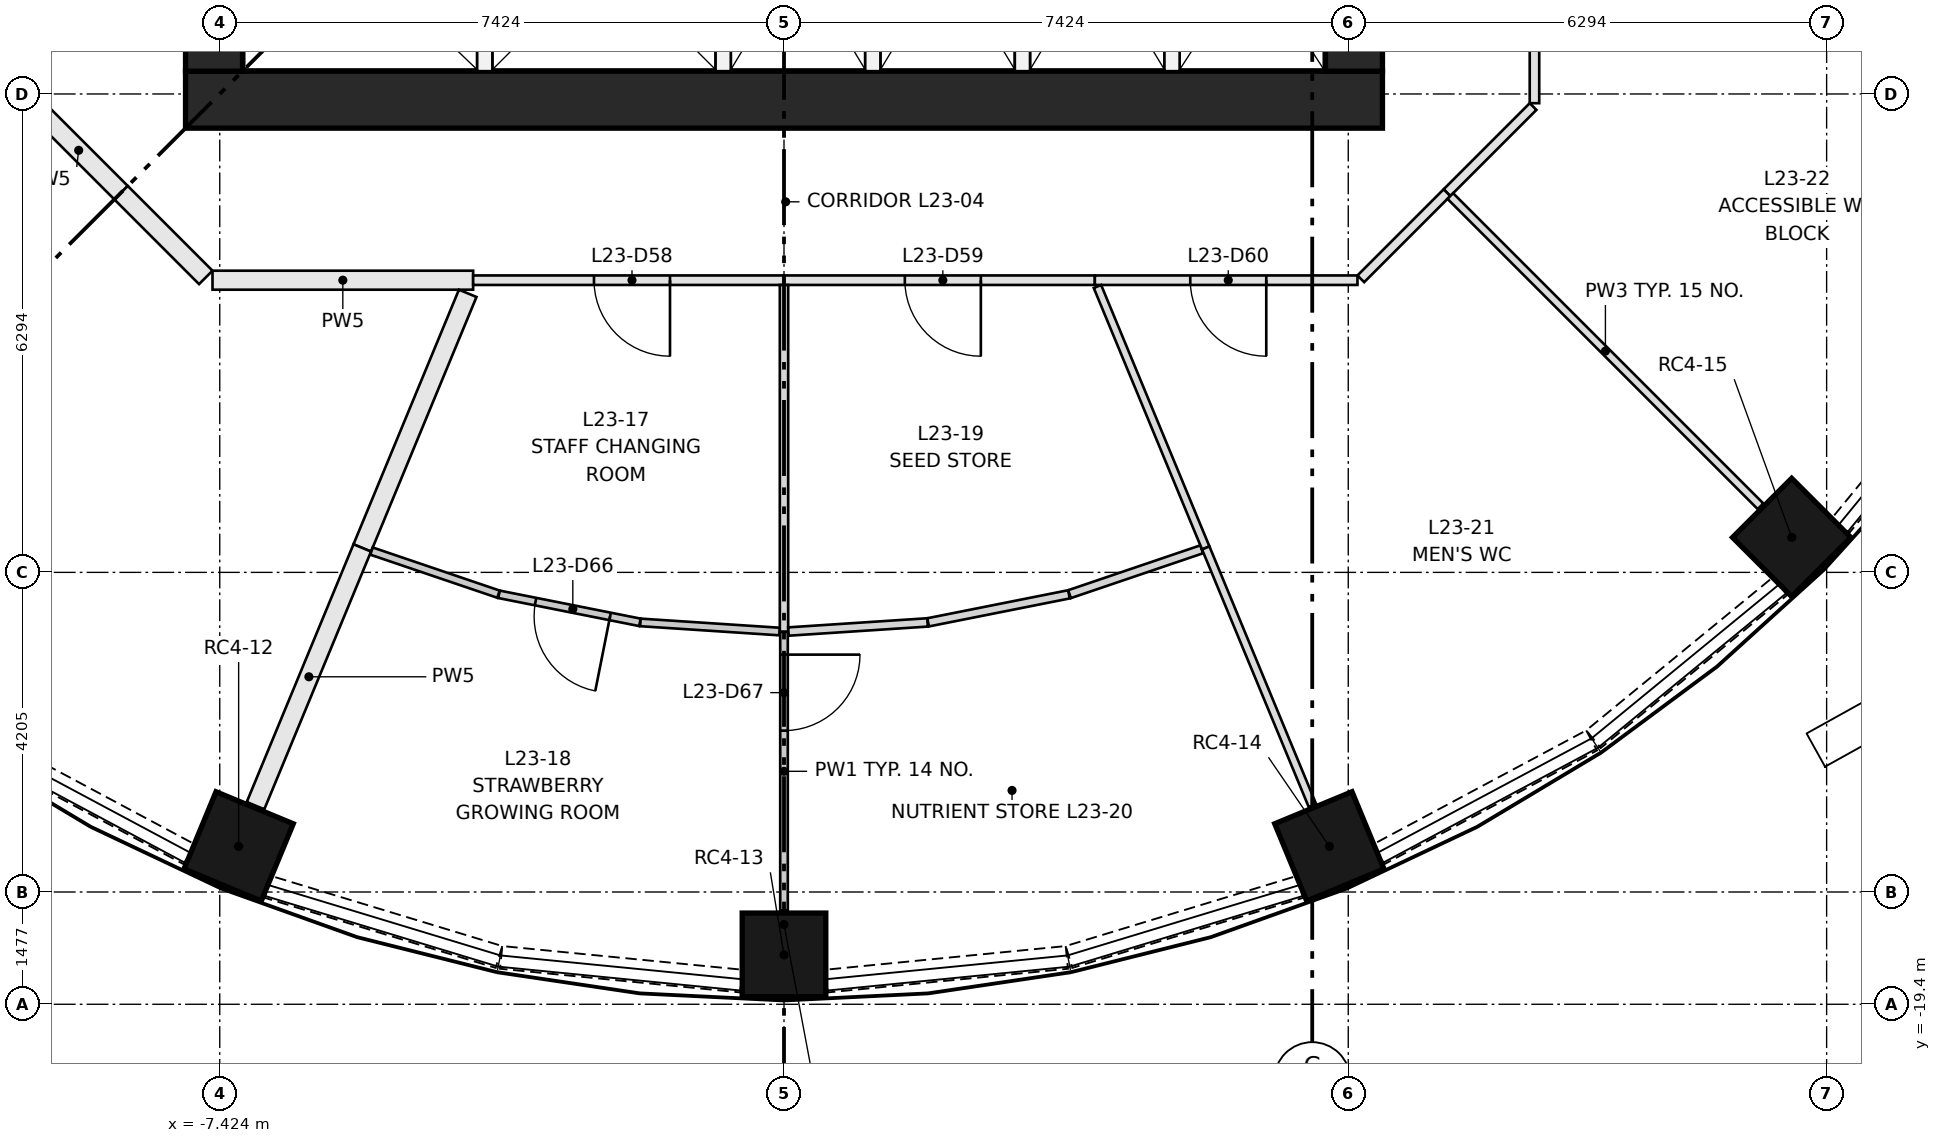
"""IFC4 building model, lengths in metres.
Left out: names, types, materials, properties, quantities, classifications, styles, units other than length and angle.
Written with IfcOpenShell. Run it as: python <this file> out.ifc"""

import sys

from ifc_helpers import new_model, si_unit, direction, frame, frame_2d, origin, origin_2d, place, context, subcontext, project, spatial, rectangle, extrude, element, fill, save


model = new_model("IFC4")
c1 = context("Model", 3, precision=1e-05, world=origin(), true_north=direction((0.0, 1.0)))
c2 = subcontext(c1, "Body", "Model", "MODEL_VIEW")
j1 = project(units=[si_unit("LENGTHUNIT", "METRE"), si_unit("PLANEANGLEUNIT", "RADIAN")], contexts=[c1])
p1 = place(None, origin())
s1 = spatial("IfcSite", under=j1, at=p1, CompositionType="ELEMENT")
p2 = place(p1, origin())
s2 = spatial("IfcBuilding", under=s1, at=p2, CompositionType="ELEMENT")
p3 = place(p2, frame((0.0, 0.0, 91.0)))
s3 = spatial("IfcBuildingStorey", under=s2, at=p3, CompositionType="ELEMENT", Elevation=91.0)
for number, where, z_axis, x_axis in (
    (1, (-7.175, -17.323, 0.0), (0.0, 0.0, 1.0), (-0.383, -0.924, 0.0)),
    (2, (0.0, -18.75, 0.0), (0.0, 0.0, 1.0), (0.0, -1.0, 0.0)),
    (3, (7.175, -17.323, 0.0), (0.0, 0.0, 1.0), (0.383, -0.924, 0.0)),
    (4, (13.258, -13.258, 0.0), (0.0, 0.0, 1.0), (0.707, -0.707, 0.0)),
):
    element("IfcColumn", number, at=place(p3, frame(where, z_axis=z_axis, x_axis=x_axis)), inside=s3, PredefinedType="COLUMN", context=c2, shape_type="SweptSolid", body=[
        extrude(rectangle(XDim=1.1, YDim=1.1, at=origin_2d()), origin(), (0.0, 0.0, 1.0), 3.65),
    ])
p4 = place(p3, frame((-7.874, -7.499, 0.0), z_axis=(0.0, 0.0, 1.0), x_axis=(1.0, 0.0, 0.0)))
e5 = element("IfcWall", 5, at=p4, inside=s3, PredefinedType="SHEAR", context=c2, shape_type="SweptSolid", body=[
    extrude(rectangle(XDim=15.748, YDim=0.75, at=frame_2d((7.874, 0.0))), origin(), (0.0, 0.0, 1.0), 3.65),
])
p5 = place(p3, frame((-7.499, -7.124, 0.0), z_axis=(0.0, 0.0, 1.0), x_axis=(0.0, 1.0, 0.0)))
e6 = element("IfcWall", 6, at=p5, inside=s3, PredefinedType="SHEAR", context=c2, shape_type="SweptSolid", body=[
    extrude(rectangle(XDim=14.248, YDim=0.75, at=frame_2d((7.124, 0.0))), origin(), (0.0, 0.0, 1.0), 3.65),
])
p6 = place(p5, frame((6.624, 0.0, 0.0)))
e7 = element("IfcOpeningElement", 7, at=p6, cuts=e6, PredefinedType="OPENING", context=c2, shape_type="SweptSolid", body=[
    extrude(rectangle(XDim=1.0, YDim=2.1, at=frame_2d((0.5, 1.05))), frame((0.0, 0.385, 0.0), z_axis=(0.0, -1.0, 0.0), x_axis=(1.0, 0.0, 0.0)), (0.0, 0.0, 1.0), 0.77),
])
p7 = place(p5, frame((3.5, 0.0, 0.0)))
e8 = element("IfcOpeningElement", 8, at=p7, cuts=e6, PredefinedType="OPENING", context=c2, shape_type="SweptSolid", body=[
    extrude(rectangle(XDim=1.8, YDim=2.1, at=frame_2d((0.9, 1.05))), frame((0.0, 0.385, 0.0), z_axis=(0.0, -1.0, 0.0), x_axis=(1.0, 0.0, 0.0)), (0.0, 0.0, 1.0), 0.77),
])
p8 = place(p5, frame((8.948, 0.0, 0.0)))
e9 = element("IfcOpeningElement", 9, at=p8, cuts=e6, PredefinedType="OPENING", context=c2, shape_type="SweptSolid", body=[
    extrude(rectangle(XDim=1.8, YDim=2.1, at=frame_2d((0.9, 1.05))), frame((0.0, 0.385, 0.0), z_axis=(0.0, -1.0, 0.0), x_axis=(1.0, 0.0, 0.0)), (0.0, 0.0, 1.0), 0.77),
])
p9 = place(p5, frame((12.124, 0.0, 0.0)))
e10 = element("IfcOpeningElement", 10, at=p9, cuts=e6, PredefinedType="OPENING", context=c2, shape_type="SweptSolid", body=[
    extrude(rectangle(XDim=1.0, YDim=2.1, at=frame_2d((0.5, 1.05))), frame((0.0, 0.385, 0.0), z_axis=(0.0, -1.0, 0.0), x_axis=(1.0, 0.0, 0.0)), (0.0, 0.0, 1.0), 0.77),
])
p10 = place(p3, frame((7.499, -7.124, 0.0), z_axis=(0.0, 0.0, 1.0), x_axis=(0.0, 1.0, 0.0)))
e11 = element("IfcWall", 11, at=p10, inside=s3, PredefinedType="SHEAR", context=c2, shape_type="SweptSolid", body=[
    extrude(rectangle(XDim=14.248, YDim=0.75, at=frame_2d((7.124, 0.0))), origin(), (0.0, 0.0, 1.0), 3.65),
])
p11 = place(p10, frame((6.624, 0.0, 0.0)))
e12 = element("IfcOpeningElement", 12, at=p11, cuts=e11, PredefinedType="OPENING", context=c2, shape_type="SweptSolid", body=[
    extrude(rectangle(XDim=1.0, YDim=2.1, at=frame_2d((0.5, 1.05))), frame((0.0, 0.385, 0.0), z_axis=(0.0, -1.0, 0.0), x_axis=(1.0, 0.0, 0.0)), (0.0, 0.0, 1.0), 0.77),
])
p12 = place(p10, frame((3.5, 0.0, 0.0)))
e13 = element("IfcOpeningElement", 13, at=p12, cuts=e11, PredefinedType="OPENING", context=c2, shape_type="SweptSolid", body=[
    extrude(rectangle(XDim=1.8, YDim=2.1, at=frame_2d((0.9, 1.05))), frame((0.0, 0.385, 0.0), z_axis=(0.0, -1.0, 0.0), x_axis=(1.0, 0.0, 0.0)), (0.0, 0.0, 1.0), 0.77),
])
p13 = place(p10, frame((8.948, 0.0, 0.0)))
e14 = element("IfcOpeningElement", 14, at=p13, cuts=e11, PredefinedType="OPENING", context=c2, shape_type="SweptSolid", body=[
    extrude(rectangle(XDim=1.8, YDim=2.1, at=frame_2d((0.9, 1.05))), frame((0.0, 0.385, 0.0), z_axis=(0.0, -1.0, 0.0), x_axis=(1.0, 0.0, 0.0)), (0.0, 0.0, 1.0), 0.77),
])
for number, where, z_axis, x_axis in (
    (15, (-3.937, -7.124, 0.0), (0.0, 0.0, 1.0), (0.0, 1.0, 0.0)),
    (16, (-0.8, -7.124, 0.0), (0.0, 0.0, 1.0), (0.0, 1.0, 0.0)),
    (17, (1.168, -7.124, 0.0), (0.0, 0.0, 1.0), (0.0, 1.0, 0.0)),
    (18, (3.137, -7.124, 0.0), (0.0, 0.0, 1.0), (0.0, 1.0, 0.0)),
    (19, (5.105, -7.124, 0.0), (0.0, 0.0, 1.0), (0.0, 1.0, 0.0)),
):
    element("IfcWall", number, at=place(p3, frame(where, z_axis=z_axis, x_axis=x_axis)), inside=s3, PredefinedType="PARTITIONING", context=c2, shape_type="SweptSolid", body=[
        extrude(rectangle(XDim=2.95, YDim=0.2, at=frame_2d((1.475, 0.0))), origin(), (0.0, 0.0, 1.0), 3.3),
    ])
p14 = place(p3, frame((-10.626, -15.929, 0.0), z_axis=(0.0, 0.0, 1.0), x_axis=(0.88188808669, -0.471458802606, 0.0)))
e20 = element("IfcWall", 20, at=p14, inside=s3, PredefinedType="SOLIDWALL", context=c2, shape_type="SweptSolid", body=[
    extrude(rectangle(XDim=3.172, YDim=0.3, at=frame_2d((1.586, 0.0))), origin(), (0.0, 0.0, 1.0), 0.9),
])
p15 = place(p3, frame((-6.787, -17.856, 0.0), z_axis=(0.0, 0.0, 1.0), x_axis=(0.956927923582, -0.290325591482, 0.0)))
e21 = element("IfcWall", 21, at=p15, inside=s3, PredefinedType="SOLIDWALL", context=c2, shape_type="SweptSolid", body=[
    extrude(rectangle(XDim=3.173, YDim=0.3, at=frame_2d((1.586, 0.0))), origin(), (0.0, 0.0, 1.0), 0.9),
])
for number, where, z_axis, x_axis in (
    (22, (-3.721, -18.783, 0.0), (0.0, 0.0, 1.0), (0.995, -0.098, 0.0)),
    (23, (0.564, -19.094, 0.0), (0.0, 0.0, 1.0), (0.995, 0.098, 0.0)),
):
    element("IfcWall", number, at=place(p3, frame(where, z_axis=z_axis, x_axis=x_axis)), inside=s3, PredefinedType="SOLIDWALL", context=c2, shape_type="SweptSolid", body=[
        extrude(rectangle(XDim=3.173, YDim=0.3, at=frame_2d((1.586, 0.0))), origin(), (0.0, 0.0, 1.0), 0.9),
    ])
p16 = place(p3, frame((3.75, -18.778, 0.0), z_axis=(0.0, 0.0, 1.0), x_axis=(0.956927923582, 0.290325591482, 0.0)))
e24 = element("IfcWall", 24, at=p16, inside=s3, PredefinedType="SOLIDWALL", context=c2, shape_type="SweptSolid", body=[
    extrude(rectangle(XDim=3.173, YDim=0.3, at=frame_2d((1.586, 0.0))), origin(), (0.0, 0.0, 1.0), 0.9),
])
p17 = place(p3, frame((7.828, -17.425, 0.0), z_axis=(0.0, 0.0, 1.0), x_axis=(0.88188808669, 0.471458802606, 0.0)))
e25 = element("IfcWall", 25, at=p17, inside=s3, PredefinedType="SOLIDWALL", context=c2, shape_type="SweptSolid", body=[
    extrude(rectangle(XDim=3.172, YDim=0.3, at=frame_2d((1.586, 0.0))), origin(), (0.0, 0.0, 1.0), 0.9),
])
for number, where, z_axis, x_axis in (
    (26, (10.651, -15.913, 0.0), (0.0, 0.0, 1.0), (0.773, 0.634, 0.0)),
    (27, (13.9, -13.104, 0.0), (0.0, 0.0, 1.0), (0.634, 0.773, 0.0)),
):
    element("IfcWall", number, at=place(p3, frame(where, z_axis=z_axis, x_axis=x_axis)), inside=s3, PredefinedType="SOLIDWALL", context=c2, shape_type="SweptSolid", body=[
        extrude(rectangle(XDim=3.173, YDim=0.3, at=frame_2d((1.586, 0.0))), origin(), (0.0, 0.0, 1.0), 0.9),
    ])
p18 = place(p3, frame((9.856, -7.589, 0.0), z_axis=(0.0, 0.0, 1.0), x_axis=(-0.70718294931, -0.707030604857, 0.0)))
e28 = element("IfcWall", 28, at=p18, inside=s3, PredefinedType="PARTITIONING", context=c2, shape_type="SweptSolid", body=[
    extrude(rectangle(XDim=1.603, YDim=0.125, at=frame_2d((0.801, 0.0))), origin(), (0.0, 0.0, 1.0), 3.3),
])
p19 = place(p3, frame((9.874, -4.09, 0.0), z_axis=(0.0, 0.0, 1.0), x_axis=(0.0, -1.0, 0.0)))
e29 = element("IfcWall", 29, at=p19, inside=s3, PredefinedType="PARTITIONING", context=c2, shape_type="SweptSolid", body=[
    extrude(rectangle(XDim=3.455, YDim=0.125, at=frame_2d((1.728, 0.0))), origin(), (0.0, 0.0, 1.0), 3.3),
])
p20 = place(p19, frame((1.2, 0.0, 0.0)))
e30 = element("IfcOpeningElement", 30, at=p20, cuts=e29, PredefinedType="OPENING", context=c2, shape_type="SweptSolid", body=[
    extrude(rectangle(XDim=1.0, YDim=2.1, at=frame_2d((0.5, 1.05))), frame((0.0, 0.073, 0.0), z_axis=(0.0, -1.0, 0.0), x_axis=(1.0, 0.0, 0.0)), (0.0, 0.0, 1.0), 0.145),
])
for number, where, z_axis, x_axis in (
    (31, (-8.722, -8.722, 0.0), (0.0, 0.0, 1.0), (-0.707, 0.707, 0.0)),
    (32, (-7.608, -9.837, 0.0), (0.0, 0.0, 1.0), (-0.707, 0.707, 0.0)),
):
    element("IfcWall", number, at=place(p3, frame(where, z_axis=z_axis, x_axis=x_axis)), inside=s3, PredefinedType="PARTITIONING", context=c2, shape_type="SweptSolid", body=[
        extrude(rectangle(XDim=1.577, YDim=0.25, at=frame_2d((0.788, 0.0))), origin(), (0.0, 0.0, 1.0), 3.3),
    ])
p21 = place(p3, frame((-4.09, -9.874, 0.0), z_axis=(0.0, 0.0, 1.0), x_axis=(-1.0, 0.0, 0.0)))
e33 = element("IfcWall", 33, at=p21, inside=s3, PredefinedType="PARTITIONING", context=c2, shape_type="SweptSolid", body=[
    extrude(rectangle(XDim=3.429, YDim=0.25, at=frame_2d((1.715, 0.0))), origin(), (0.0, 0.0, 1.0), 3.3),
])
p22 = place(p3, frame((0.0, -9.874, 0.0), z_axis=(0.0, 0.0, 1.0), x_axis=(-1.0, 0.0, 0.0)))
e34 = element("IfcWall", 34, at=p22, inside=s3, PredefinedType="PARTITIONING", context=c2, shape_type="SweptSolid", body=[
    extrude(rectangle(XDim=4.09, YDim=0.125, at=frame_2d((2.045, 0.0))), origin(), (0.0, 0.0, 1.0), 3.3),
])
p23 = place(p22, frame((1.5, 0.0, 0.0)))
e35 = element("IfcOpeningElement", 35, at=p23, cuts=e34, PredefinedType="OPENING", context=c2, shape_type="SweptSolid", body=[
    extrude(rectangle(XDim=1.0, YDim=2.1, at=frame_2d((0.5, 1.05))), frame((0.0, 0.073, 0.0), z_axis=(0.0, -1.0, 0.0), x_axis=(1.0, 0.0, 0.0)), (0.0, 0.0, 1.0), 0.145),
])
p24 = place(p3, frame((4.09, -9.874, 0.0), z_axis=(0.0, 0.0, 1.0), x_axis=(-1.0, 0.0, 0.0)))
e36 = element("IfcWall", 36, at=p24, inside=s3, PredefinedType="PARTITIONING", context=c2, shape_type="SweptSolid", body=[
    extrude(rectangle(XDim=4.09, YDim=0.125, at=frame_2d((2.045, 0.0))), origin(), (0.0, 0.0, 1.0), 3.3),
])
p25 = place(p24, frame((1.5, 0.0, 0.0)))
e37 = element("IfcOpeningElement", 37, at=p25, cuts=e36, PredefinedType="OPENING", context=c2, shape_type="SweptSolid", body=[
    extrude(rectangle(XDim=1.0, YDim=2.1, at=frame_2d((0.5, 1.05))), frame((0.0, 0.073, 0.0), z_axis=(0.0, -1.0, 0.0), x_axis=(1.0, 0.0, 0.0)), (0.0, 0.0, 1.0), 0.145),
])
p26 = place(p3, frame((7.545, -9.874, 0.0), z_axis=(0.0, 0.0, 1.0), x_axis=(-1.0, 0.0, 0.0)))
e38 = element("IfcWall", 38, at=p26, inside=s3, PredefinedType="PARTITIONING", context=c2, shape_type="SweptSolid", body=[
    extrude(rectangle(XDim=3.455, YDim=0.125, at=frame_2d((1.728, 0.0))), origin(), (0.0, 0.0, 1.0), 3.3),
])
p27 = place(p26, frame((1.2, 0.0, 0.0)))
e39 = element("IfcOpeningElement", 39, at=p27, cuts=e38, PredefinedType="OPENING", context=c2, shape_type="SweptSolid", body=[
    extrude(rectangle(XDim=1.0, YDim=2.1, at=frame_2d((0.5, 1.05))), frame((0.0, 0.073, 0.0), z_axis=(0.0, -1.0, 0.0), x_axis=(1.0, 0.0, 0.0)), (0.0, 0.0, 1.0), 0.145),
])
p28 = place(p3, frame((8.722, -8.722, 0.0), z_axis=(0.0, 0.0, 1.0), x_axis=(-0.707030604857, -0.70718294931, 0.0)))
e40 = element("IfcWall", 40, at=p28, inside=s3, PredefinedType="PARTITIONING", context=c2, shape_type="SweptSolid", body=[
    extrude(rectangle(XDim=1.603, YDim=0.125, at=frame_2d((0.801, 0.0))), origin(), (0.0, 0.0, 1.0), 3.3),
])
p29 = place(p3, frame((-4.162, -10.047, 0.0), z_axis=(0.0, 0.0, 1.0), x_axis=(-0.382649180879, -0.923893719197, 0.0)))
e41 = element("IfcWall", 41, at=p29, inside=s3, PredefinedType="PARTITIONING", context=c2, shape_type="SweptSolid", body=[
    extrude(rectangle(XDim=3.625, YDim=0.25, at=frame_2d((1.812, 0.0))), origin(), (0.0, 0.0, 1.0), 3.3),
])
p30 = place(p3, frame((-5.549, -13.396, 0.0), z_axis=(0.0, 0.0, 1.0), x_axis=(-0.382706260748, -0.923870076355, 0.0)))
e42 = element("IfcWall", 42, at=p30, inside=s3, PredefinedType="PARTITIONING", context=c2, shape_type="SweptSolid", body=[
    extrude(rectangle(XDim=3.67, YDim=0.25, at=frame_2d((1.835, 0.0))), origin(), (0.0, 0.0, 1.0), 3.3),
])
p31 = place(p3, frame((-3.756, -14.005, 0.0), z_axis=(0.0, 0.0, 1.0), x_axis=(-0.946911786272, 0.321493497633, 0.0)))
e43 = element("IfcWall", 43, at=p31, inside=s3, PredefinedType="PARTITIONING", context=c2, shape_type="SweptSolid", body=[
    extrude(rectangle(XDim=1.765, YDim=0.1, at=frame_2d((0.882, 0.0))), origin(), (0.0, 0.0, 1.0), 3.3),
])
p32 = place(p3, frame((-1.896, -14.375, 0.0), z_axis=(0.0, 0.0, 1.0), x_axis=(-0.980773924018, 0.19514740574, 0.0)))
e44 = element("IfcWall", 44, at=p32, inside=s3, PredefinedType="PARTITIONING", context=c2, shape_type="SweptSolid", body=[
    extrude(rectangle(XDim=1.89, YDim=0.1, at=frame_2d((0.945, 0.0))), origin(), (0.0, 0.0, 1.0), 3.3),
])
p33 = place(p32, frame((0.4, 0.0, 0.0)))
e45 = element("IfcOpeningElement", 45, at=p33, cuts=e44, PredefinedType="OPENING", context=c2, shape_type="SweptSolid", body=[
    extrude(rectangle(XDim=1.0, YDim=2.1, at=frame_2d((0.5, 1.05))), frame((0.0, 0.06, 0.0), z_axis=(0.0, -1.0, 0.0), x_axis=(1.0, 0.0, 0.0)), (0.0, 0.0, 1.0), 0.12),
])
p34 = place(p3, frame((-0.058, -14.496, 0.0), z_axis=(0.0, 0.0, 1.0), x_axis=(-0.99786392157, 0.065326824732, 0.0)))
e46 = element("IfcWall", 46, at=p34, inside=s3, PredefinedType="PARTITIONING", context=c2, shape_type="SweptSolid", body=[
    extrude(rectangle(XDim=1.835, YDim=0.1, at=frame_2d((0.917, 0.0))), origin(), (0.0, 0.0, 1.0), 3.3),
])
p35 = place(p3, frame((0.0, -9.937, 0.0), z_axis=(0.0, 0.0, 1.0), x_axis=(0.0, -1.0, 0.0)))
e47 = element("IfcWall", 47, at=p35, inside=s3, PredefinedType="PARTITIONING", context=c2, shape_type="SweptSolid", body=[
    extrude(rectangle(XDim=4.563, YDim=0.11, at=frame_2d((2.282, 0.0))), origin(), (0.0, 0.0, 1.0), 3.3),
])
p36 = place(p3, frame((0.0, -14.5, 0.0), z_axis=(0.0, 0.0, 1.0), x_axis=(0.0, -1.0, 0.0)))
e48 = element("IfcWall", 48, at=p36, inside=s3, PredefinedType="PARTITIONING", context=c2, shape_type="SweptSolid", body=[
    extrude(rectangle(XDim=3.67, YDim=0.1, at=frame_2d((1.835, 0.0))), origin(), (0.0, 0.0, 1.0), 3.3),
])
p37 = place(p36, frame((0.3, 0.0, 0.0)))
e49 = element("IfcOpeningElement", 49, at=p37, cuts=e48, PredefinedType="OPENING", context=c2, shape_type="SweptSolid", body=[
    extrude(rectangle(XDim=1.0, YDim=2.1, at=frame_2d((0.5, 1.05))), frame((0.0, 0.06, 0.0), z_axis=(0.0, -1.0, 0.0), x_axis=(1.0, 0.0, 0.0)), (0.0, 0.0, 1.0), 0.12),
])
p38 = place(p3, frame((1.889, -14.376, 0.0), z_axis=(0.0, 0.0, 1.0), x_axis=(-0.99786221716, -0.065352854292, 0.0)))
e50 = element("IfcWall", 50, at=p38, inside=s3, PredefinedType="PARTITIONING", context=c2, shape_type="SweptSolid", body=[
    extrude(rectangle(XDim=1.834, YDim=0.11, at=frame_2d((0.917, 0.0))), origin(), (0.0, 0.0, 1.0), 3.3),
])
p39 = place(p3, frame((3.75, -14.007, 0.0), z_axis=(0.0, 0.0, 1.0), x_axis=(-0.980788807459, -0.195072589471, 0.0)))
e51 = element("IfcWall", 51, at=p39, inside=s3, PredefinedType="PARTITIONING", context=c2, shape_type="SweptSolid", body=[
    extrude(rectangle(XDim=1.89, YDim=0.11, at=frame_2d((0.945, 0.0))), origin(), (0.0, 0.0, 1.0), 3.3),
])
p40 = place(p3, frame((5.496, -13.414, 0.0), z_axis=(0.0, 0.0, 1.0), x_axis=(-0.946941139485, -0.321407029095, 0.0)))
e52 = element("IfcWall", 52, at=p40, inside=s3, PredefinedType="PARTITIONING", context=c2, shape_type="SweptSolid", body=[
    extrude(rectangle(XDim=1.837, YDim=0.11, at=frame_2d((0.918, 0.0))), origin(), (0.0, 0.0, 1.0), 3.3),
])
p41 = place(p3, frame((4.124, -9.957, 0.0), z_axis=(0.0, 0.0, 1.0), x_axis=(0.382691554869, -0.923876168018, 0.0)))
e53 = element("IfcWall", 53, at=p41, inside=s3, PredefinedType="PARTITIONING", context=c2, shape_type="SweptSolid", body=[
    extrude(rectangle(XDim=3.723, YDim=0.105, at=frame_2d((1.862, 0.0))), origin(), (0.0, 0.0, 1.0), 3.3),
])
p42 = place(p3, frame((5.549, -13.396, 0.0), z_axis=(0.0, 0.0, 1.0), x_axis=(0.382706260748, -0.923870076355, 0.0)))
e54 = element("IfcWall", 54, at=p42, inside=s3, PredefinedType="PARTITIONING", context=c2, shape_type="SweptSolid", body=[
    extrude(rectangle(XDim=3.67, YDim=0.105, at=frame_2d((1.835, 0.0))), origin(), (0.0, 0.0, 1.0), 3.3),
])
p43 = place(p3, frame((8.767, -8.767, 0.0), z_axis=(0.0, 0.0, 1.0), x_axis=(0.707106781187, -0.707106781187, 0.0)))
e55 = element("IfcWall", 55, at=p43, inside=s3, PredefinedType="PARTITIONING", context=c2, shape_type="SweptSolid", body=[
    extrude(rectangle(XDim=5.772, YDim=0.105, at=frame_2d((2.886, 0.0))), origin(), (0.0, 0.0, 1.0), 3.3),
])
p44 = place(p3, frame((14.043, -5.817, 0.0), z_axis=(0.0, 0.0, 1.0), x_axis=(0.923889594764, -0.382659139036, 0.0)))
e56 = element("IfcWall", 56, at=p44, inside=s3, PredefinedType="PARTITIONING", context=c2, shape_type="SweptSolid", body=[
    extrude(rectangle(XDim=2.97, YDim=0.105, at=frame_2d((1.485, 0.0))), origin(), (0.0, 0.0, 1.0), 3.3),
])
p45 = place(p23, origin())
e57 = element("IfcDoor", 57, at=p45, inside=s3, OperationType="SINGLE_SWING_LEFT", PredefinedType="DOOR", context=c2, shape_type="SweptSolid", body=[
    extrude(rectangle(XDim=1.0, YDim=2.1, at=frame_2d((0.5, 1.05))), frame((0.0, 0.025, 0.0), z_axis=(0.0, -1.0, 0.0), x_axis=(1.0, 0.0, 0.0)), (0.0, 0.0, 1.0), 0.05),
])
fill(e35, e57)
p46 = place(p25, origin())
e58 = element("IfcDoor", 58, at=p46, inside=s3, OperationType="SINGLE_SWING_LEFT", PredefinedType="DOOR", context=c2, shape_type="SweptSolid", body=[
    extrude(rectangle(XDim=1.0, YDim=2.1, at=frame_2d((0.5, 1.05))), frame((0.0, 0.025, 0.0), z_axis=(0.0, -1.0, 0.0), x_axis=(1.0, 0.0, 0.0)), (0.0, 0.0, 1.0), 0.05),
])
fill(e37, e58)
p47 = place(p27, origin())
e59 = element("IfcDoor", 59, at=p47, inside=s3, OperationType="SINGLE_SWING_LEFT", PredefinedType="DOOR", context=c2, shape_type="SweptSolid", body=[
    extrude(rectangle(XDim=1.0, YDim=2.1, at=frame_2d((0.5, 1.05))), frame((0.0, 0.025, 0.0), z_axis=(0.0, -1.0, 0.0), x_axis=(1.0, 0.0, 0.0)), (0.0, 0.0, 1.0), 0.05),
])
fill(e39, e59)
p48 = place(p33, origin())
e60 = element("IfcDoor", 60, at=p48, inside=s3, OperationType="SINGLE_SWING_LEFT", PredefinedType="DOOR", context=c2, shape_type="SweptSolid", body=[
    extrude(rectangle(XDim=1.0, YDim=2.1, at=frame_2d((0.5, 1.05))), frame((0.0, 0.025, 0.0), z_axis=(0.0, -1.0, 0.0), x_axis=(1.0, 0.0, 0.0)), (0.0, 0.0, 1.0), 0.05),
])
fill(e45, e60)
p49 = place(p37, origin())
e61 = element("IfcDoor", 61, at=p49, inside=s3, OperationType="SINGLE_SWING_LEFT", PredefinedType="DOOR", context=c2, shape_type="SweptSolid", body=[
    extrude(rectangle(XDim=1.0, YDim=2.1, at=frame_2d((0.5, 1.05))), frame((0.0, 0.025, 0.0), z_axis=(0.0, -1.0, 0.0), x_axis=(1.0, 0.0, 0.0)), (0.0, 0.0, 1.0), 0.05),
])
fill(e49, e61)
save(model, sys.argv[1])
